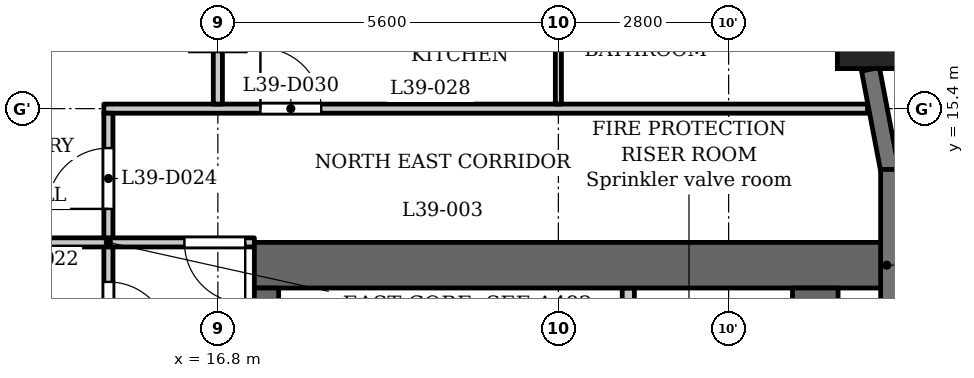
"""IFC4 building model, lengths in metres.
Left out: names, types, materials, properties, quantities, classifications, styles, units other than length and angle.
Written with IfcOpenShell. Run it as: python <this file> out.ifc"""

import sys

from ifc_helpers import new_model, si_unit, direction, frame, frame_2d, origin, origin_2d, place, context, subcontext, project, spatial, rectangle, extrude, element, fill, save


model = new_model("IFC4")
c1 = context("Model", 3, precision=1e-05, world=origin(), true_north=direction((0.0, 1.0)))
c2 = subcontext(c1, "Body", "Model", "MODEL_VIEW")
j1 = project(units=[si_unit("LENGTHUNIT", "METRE"), si_unit("PLANEANGLEUNIT", "RADIAN")], contexts=[c1])
p1 = place(None, origin())
s1 = spatial("IfcSite", under=j1, at=p1, CompositionType="ELEMENT")
p2 = place(p1, origin())
s2 = spatial("IfcBuilding", under=s1, at=p2, CompositionType="ELEMENT")
p3 = place(p2, frame((0.0, 0.0, 153.6)))
s3 = spatial("IfcBuildingStorey", under=s2, at=p3, CompositionType="ELEMENT", Elevation=153.6)
p4 = place(p3, frame((27.538, 16.609, 0.0), z_axis=(0.0, 0.0, 1.0), x_axis=(1.0, 0.0, 0.0)))
e1 = element("IfcColumn", 1, at=p4, inside=s3, PredefinedType="COLUMN", context=c2, shape_type="SweptSolid", body=[
    extrude(rectangle(XDim=1.1, YDim=1.1, at=origin_2d()), origin(), (0.0, 0.0, 1.0), 3.5),
])
p5 = place(p3, frame((27.85, 11.75, 0.0), z_axis=(0.0, 0.0, 1.0), x_axis=(0.0, 1.0, 0.0)))
e2 = element("IfcWall", 2, at=p5, inside=s3, PredefinedType="SOLIDWALL", context=c2, shape_type="SweptSolid", body=[
    extrude(rectangle(XDim=2.65, YDim=0.3, at=frame_2d((1.325, 0.0))), origin(), (0.0, 0.0, 1.0), 2.45),
])
p6 = place(p3, frame((27.853, 14.372, 0.0), z_axis=(0.0, 0.0, 1.0), x_axis=(-0.187302784601, 0.982302227871, 0.0)))
e3 = element("IfcWall", 3, at=p6, inside=s3, PredefinedType="SOLIDWALL", context=c2, shape_type="SweptSolid", body=[
    extrude(rectangle(XDim=1.706, YDim=0.3, at=frame_2d((0.853, 0.0))), origin(), (0.0, 0.0, 1.0), 2.45),
])
p7 = place(p3, frame((17.4, 12.825, 0.0), z_axis=(0.0, 0.0, 1.0), x_axis=(1.0, 0.0, 0.0)))
e4 = element("IfcWall", 4, at=p7, inside=s3, PredefinedType="SHEAR", context=c2, shape_type="SweptSolid", body=[
    extrude(rectangle(XDim=10.4, YDim=0.75, at=frame_2d((5.2, 0.0))), origin(), (0.0, 0.0, 1.0), 3.2),
])
p8 = place(p3, frame((17.6, -12.45, 0.0), z_axis=(0.0, 0.0, 1.0), x_axis=(0.0, 1.0, 0.0)))
e5 = element("IfcWall", 5, at=p8, inside=s3, PredefinedType="SHEAR", context=c2, shape_type="SweptSolid", body=[
    extrude(rectangle(XDim=24.9, YDim=0.4, at=frame_2d((12.45, 0.0))), origin(), (0.0, 0.0, 1.0), 3.2),
])
p9 = place(p8, frame((6.325, 0.0, 0.0)))
e6 = element("IfcOpeningElement", 6, at=p9, cuts=e5, PredefinedType="OPENING", context=c2, shape_type="SweptSolid", body=[
    extrude(rectangle(XDim=0.9, YDim=2.1, at=frame_2d((0.45, 1.05))), frame((0.0, 0.21, 0.0), z_axis=(0.0, -1.0, 0.0), x_axis=(1.0, 0.0, 0.0)), (0.0, 0.0, 1.0), 0.42),
])
p10 = place(p8, frame((9.925, 0.0, 0.0)))
e7 = element("IfcOpeningElement", 7, at=p10, cuts=e5, PredefinedType="OPENING", context=c2, shape_type="SweptSolid", body=[
    extrude(rectangle(XDim=0.9, YDim=2.1, at=frame_2d((0.45, 1.05))), frame((0.0, 0.21, 0.0), z_axis=(0.0, -1.0, 0.0), x_axis=(1.0, 0.0, 0.0)), (0.0, 0.0, 1.0), 0.42),
])
p11 = place(p8, frame((15.6, 0.0, 0.0)))
e8 = element("IfcOpeningElement", 8, at=p11, cuts=e5, PredefinedType="OPENING", context=c2, shape_type="SweptSolid", body=[
    extrude(rectangle(XDim=1.1, YDim=2.1, at=frame_2d((0.55, 1.05))), frame((0.0, 0.21, 0.0), z_axis=(0.0, -1.0, 0.0), x_axis=(1.0, 0.0, 0.0)), (0.0, 0.0, 1.0), 0.42),
])
p12 = place(p8, frame((18.0, 0.0, 0.0)))
e9 = element("IfcOpeningElement", 9, at=p12, cuts=e5, PredefinedType="OPENING", context=c2, shape_type="SweptSolid", body=[
    extrude(rectangle(XDim=1.1, YDim=2.1, at=frame_2d((0.55, 1.05))), frame((0.0, 0.21, 0.0), z_axis=(0.0, -1.0, 0.0), x_axis=(1.0, 0.0, 0.0)), (0.0, 0.0, 1.0), 0.42),
])
p13 = place(p8, frame((23.025, 0.0, 0.0)))
e10 = element("IfcOpeningElement", 10, at=p13, cuts=e5, PredefinedType="OPENING", context=c2, shape_type="SweptSolid", body=[
    extrude(rectangle(XDim=1.1, YDim=2.1, at=frame_2d((0.55, 1.05))), frame((0.0, 0.21, 0.0), z_axis=(0.0, -1.0, 0.0), x_axis=(1.0, 0.0, 0.0)), (0.0, 0.0, 1.0), 0.42),
])
p14 = place(p8, frame((0.775, 0.0, 0.0)))
e11 = element("IfcOpeningElement", 11, at=p14, cuts=e5, PredefinedType="OPENING", context=c2, shape_type="SweptSolid", body=[
    extrude(rectangle(XDim=1.1, YDim=2.1, at=frame_2d((0.55, 1.05))), frame((0.0, 0.21, 0.0), z_axis=(0.0, -1.0, 0.0), x_axis=(1.0, 0.0, 0.0)), (0.0, 0.0, 1.0), 0.42),
])
p15 = place(p8, frame((12.925, 0.0, 0.0)))
e12 = element("IfcOpeningElement", 12, at=p15, cuts=e5, PredefinedType="OPENING", context=c2, shape_type="SweptSolid", body=[
    extrude(rectangle(XDim=1.8, YDim=2.1, at=frame_2d((0.9, 1.05))), frame((0.0, 0.21, 0.0), z_axis=(0.0, -1.0, 0.0), x_axis=(1.0, 0.0, 0.0)), (0.0, 0.0, 1.0), 0.42),
])
p16 = place(p3, frame((26.625, -12.45, 0.0), z_axis=(0.0, 0.0, 1.0), x_axis=(0.0, 1.0, 0.0)))
e13 = element("IfcWall", 13, at=p16, inside=s3, PredefinedType="SHEAR", context=c2, shape_type="SweptSolid", body=[
    extrude(rectangle(XDim=24.9, YDim=0.75, at=frame_2d((12.45, 0.0))), origin(), (0.0, 0.0, 1.0), 3.2),
])
p17 = place(p3, frame((23.55, 9.8, 0.0), z_axis=(0.0, 0.0, 1.0), x_axis=(0.0, 1.0, 0.0)))
e14 = element("IfcWall", 14, at=p17, inside=s3, PredefinedType="PARTITIONING", context=c2, shape_type="SweptSolid", body=[
    extrude(rectangle(XDim=2.65, YDim=0.2, at=frame_2d((1.325, 0.0))), origin(), (0.0, 0.0, 1.0), 3.2),
])
p18 = place(p17, frame((0.875, 0.0, 0.0)))
e15 = element("IfcOpeningElement", 15, at=p18, cuts=e14, PredefinedType="OPENING", context=c2, shape_type="SweptSolid", body=[
    extrude(rectangle(XDim=0.9, YDim=2.1, at=frame_2d((0.45, 1.05))), frame((0.0, 0.11, 0.0), z_axis=(0.0, -1.0, 0.0), x_axis=(1.0, 0.0, 0.0)), (0.0, 0.0, 1.0), 0.22),
])
p19 = place(p3, frame((-17.4, 13.2, 0.0), z_axis=(0.0, 0.0, 1.0), x_axis=(1.0, 0.0, 0.0)))
e16 = element("IfcWall", 16, at=p19, inside=s3, PredefinedType="PARTITIONING", context=c2, shape_type="SweptSolid", body=[
    extrude(rectangle(XDim=34.8, YDim=0.15, at=frame_2d((17.4, 0.0))), origin(), (0.0, 0.0, 1.0), 3.2),
])
p20 = place(p19, frame((0.25, 0.0, 0.0)))
e17 = element("IfcOpeningElement", 17, at=p20, cuts=e16, PredefinedType="OPENING", context=c2, shape_type="SweptSolid", body=[
    extrude(rectangle(XDim=1.0, YDim=2.1, at=frame_2d((0.5, 1.05))), frame((0.0, 0.085, 0.0), z_axis=(0.0, -1.0, 0.0), x_axis=(1.0, 0.0, 0.0)), (0.0, 0.0, 1.0), 0.17),
])
p21 = place(p19, frame((33.65, 0.0, 0.0)))
e18 = element("IfcOpeningElement", 18, at=p21, cuts=e16, PredefinedType="OPENING", context=c2, shape_type="SweptSolid", body=[
    extrude(rectangle(XDim=1.0, YDim=2.1, at=frame_2d((0.5, 1.05))), frame((0.0, 0.085, 0.0), z_axis=(0.0, -1.0, 0.0), x_axis=(1.0, 0.0, 0.0)), (0.0, 0.0, 1.0), 0.17),
])
p22 = place(p19, frame((13.75, 0.0, 0.0)))
e19 = element("IfcOpeningElement", 19, at=p22, cuts=e16, PredefinedType="OPENING", context=c2, shape_type="SweptSolid", body=[
    extrude(rectangle(XDim=1.0, YDim=2.1, at=frame_2d((0.5, 1.05))), frame((0.0, 0.085, 0.0), z_axis=(0.0, -1.0, 0.0), x_axis=(1.0, 0.0, 0.0)), (0.0, 0.0, 1.0), 0.17),
])
p23 = place(p3, frame((14.925, 15.4, 0.0), z_axis=(0.0, 0.0, 1.0), x_axis=(1.0, 0.0, 0.0)))
e20 = element("IfcWall", 20, at=p23, inside=s3, PredefinedType="PARTITIONING", context=c2, shape_type="SweptSolid", body=[
    extrude(rectangle(XDim=12.559, YDim=0.15, at=frame_2d((6.279, 0.0))), origin(), (0.0, 0.0, 1.0), 3.2),
])
p24 = place(p23, frame((2.575, 0.0, 0.0)))
e21 = element("IfcOpeningElement", 21, at=p24, cuts=e20, PredefinedType="OPENING", context=c2, shape_type="SweptSolid", body=[
    extrude(rectangle(XDim=1.0, YDim=2.1, at=frame_2d((0.5, 1.05))), frame((0.0, 0.085, 0.0), z_axis=(0.0, -1.0, 0.0), x_axis=(1.0, 0.0, 0.0)), (0.0, 0.0, 1.0), 0.17),
])
p25 = place(p3, frame((15.0, 6.769, 0.0), z_axis=(0.0, 0.0, 1.0), x_axis=(0.0, 1.0, 0.0)))
e22 = element("IfcWall", 22, at=p25, inside=s3, PredefinedType="PARTITIONING", context=c2, shape_type="SweptSolid", body=[
    extrude(rectangle(XDim=6.356, YDim=0.15, at=frame_2d((3.178, 0.0))), origin(), (0.0, 0.0, 1.0), 3.2),
])
p26 = place(p25, frame((4.781, 0.0, 0.0)))
e23 = element("IfcOpeningElement", 23, at=p26, cuts=e22, PredefinedType="OPENING", context=c2, shape_type="SweptSolid", body=[
    extrude(rectangle(XDim=1.0, YDim=2.1, at=frame_2d((0.5, 1.05))), frame((0.0, 0.085, 0.0), z_axis=(0.0, -1.0, 0.0), x_axis=(1.0, 0.0, 0.0)), (0.0, 0.0, 1.0), 0.17),
])
p27 = place(p3, frame((15.0, 13.275, 0.0), z_axis=(0.0, 0.0, 1.0), x_axis=(0.0, 1.0, 0.0)))
e24 = element("IfcWall", 24, at=p27, inside=s3, PredefinedType="PARTITIONING", context=c2, shape_type="SweptSolid", body=[
    extrude(rectangle(XDim=2.05, YDim=0.15, at=frame_2d((1.025, 0.0))), origin(), (0.0, 0.0, 1.0), 3.2),
])
p28 = place(p27, frame((0.476, 0.0, 0.0)))
e25 = element("IfcOpeningElement", 25, at=p28, cuts=e24, PredefinedType="OPENING", context=c2, shape_type="SweptSolid", body=[
    extrude(rectangle(XDim=1.0, YDim=2.1, at=frame_2d((0.5, 1.05))), frame((0.0, 0.085, 0.0), z_axis=(0.0, -1.0, 0.0), x_axis=(1.0, 0.0, 0.0)), (0.0, 0.0, 1.0), 0.17),
])
p29 = place(p3, frame((16.8, 15.475, 0.0), z_axis=(0.0, 0.0, 1.0), x_axis=(0.0, 1.0, 0.0)))
e26 = element("IfcWall", 26, at=p29, inside=s3, PredefinedType="PARTITIONING", context=c2, shape_type="SweptSolid", body=[
    extrude(rectangle(XDim=7.455, YDim=0.15, at=frame_2d((3.728, 0.0))), origin(), (0.0, 0.0, 1.0), 3.2),
])
p30 = place(p3, frame((22.4, 15.475, 0.0), z_axis=(0.0, 0.0, 1.0), x_axis=(0.0, 1.0, 0.0)))
e27 = element("IfcWall", 27, at=p30, inside=s3, PredefinedType="PARTITIONING", context=c2, shape_type="SweptSolid", body=[
    extrude(rectangle(XDim=2.275, YDim=0.1, at=frame_2d((1.137, 0.0))), origin(), (0.0, 0.0, 1.0), 3.2),
])
p31 = place(p26, origin())
e28 = element("IfcDoor", 28, at=p31, inside=s3, OperationType="SINGLE_SWING_LEFT", PredefinedType="DOOR", context=c2, shape_type="SweptSolid", body=[
    extrude(rectangle(XDim=1.0, YDim=2.1, at=frame_2d((0.5, 1.05))), frame((0.0, 0.025, 0.0), z_axis=(0.0, -1.0, 0.0), x_axis=(1.0, 0.0, 0.0)), (0.0, 0.0, 1.0), 0.05),
])
fill(e23, e28)
p32 = place(p21, origin())
e29 = element("IfcDoor", 29, at=p32, inside=s3, OperationType="SINGLE_SWING_RIGHT", PredefinedType="DOOR", context=c2, shape_type="SweptSolid", body=[
    extrude(rectangle(XDim=1.0, YDim=2.1, at=frame_2d((0.5, 1.05))), frame((0.0, 0.025, 0.0), z_axis=(0.0, -1.0, 0.0), x_axis=(1.0, 0.0, 0.0)), (0.0, 0.0, 1.0), 0.05),
])
fill(e18, e29)
p33 = place(p28, origin())
e30 = element("IfcDoor", 30, at=p33, inside=s3, OperationType="SINGLE_SWING_RIGHT", PredefinedType="DOOR", context=c2, shape_type="SweptSolid", body=[
    extrude(rectangle(XDim=1.0, YDim=2.1, at=frame_2d((0.5, 1.05))), frame((0.0, 0.025, 0.0), z_axis=(0.0, -1.0, 0.0), x_axis=(1.0, 0.0, 0.0)), (0.0, 0.0, 1.0), 0.05),
])
fill(e25, e30)
p34 = place(p24, origin())
e31 = element("IfcDoor", 31, at=p34, inside=s3, OperationType="SINGLE_SWING_RIGHT", PredefinedType="DOOR", context=c2, shape_type="SweptSolid", body=[
    extrude(rectangle(XDim=1.0, YDim=2.1, at=frame_2d((0.5, 1.05))), frame((0.0, 0.025, 0.0), z_axis=(0.0, -1.0, 0.0), x_axis=(1.0, 0.0, 0.0)), (0.0, 0.0, 1.0), 0.05),
])
fill(e21, e31)
save(model, sys.argv[1])
